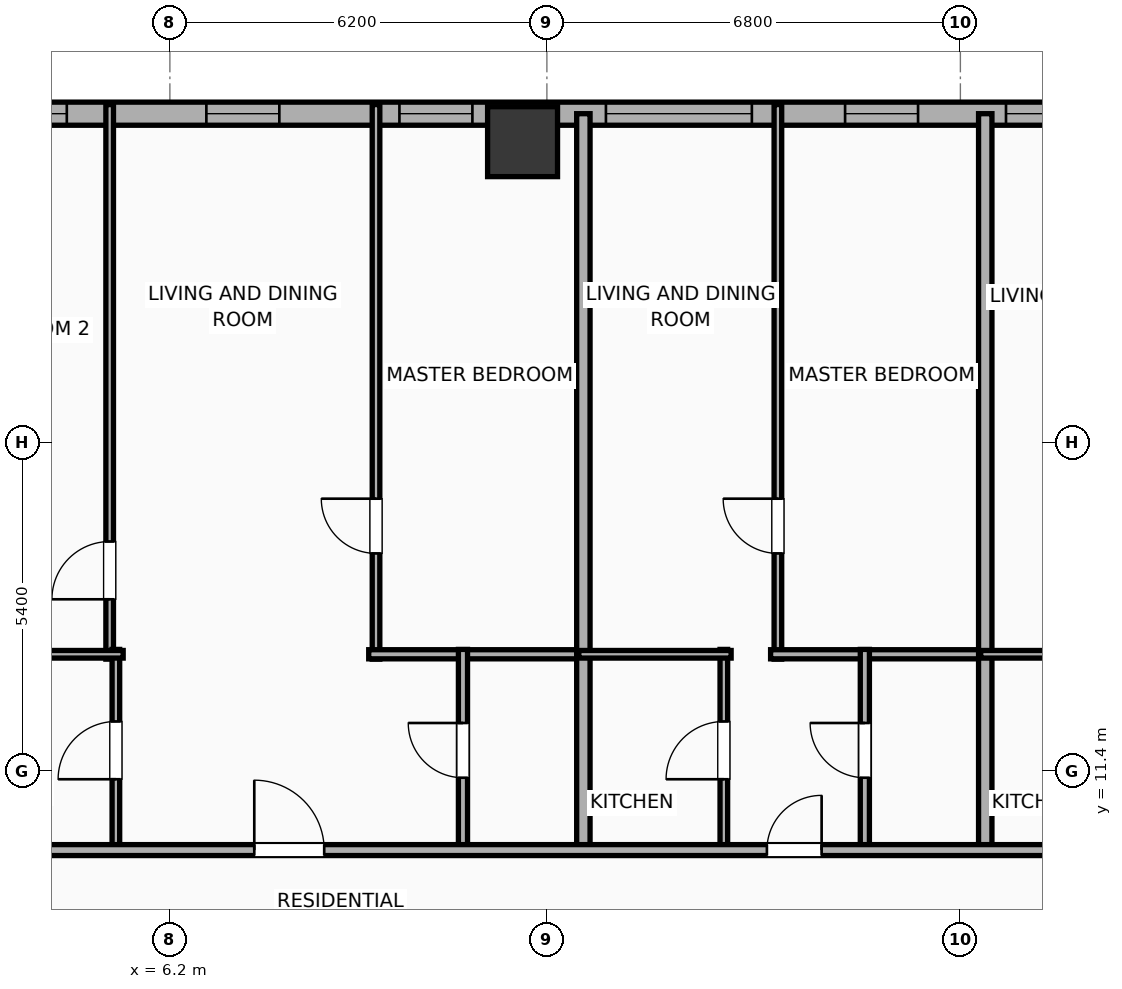
"""IFC4 building model, lengths in metres.
Left out: names, types, materials, properties, quantities, classifications, styles, units other than length and angle.
Written with IfcOpenShell. Run it as: python <this file> out.ifc"""

import sys

from ifc_helpers import new_model, si_unit, direction, frame, frame_2d, origin, origin_2d, place, context, subcontext, project, spatial, rectangle, hollow_rectangle, extrude, element, fill, save


model = new_model("IFC4")
c1 = context("Model", 3, precision=1e-05, world=origin(), true_north=direction((0.0, 1.0)))
c2 = subcontext(c1, "Body", "Model", "MODEL_VIEW")
j1 = project(units=[si_unit("LENGTHUNIT", "METRE"), si_unit("PLANEANGLEUNIT", "RADIAN")], contexts=[c1])
p1 = place(None, origin())
s1 = spatial("IfcSite", under=j1, at=p1, CompositionType="ELEMENT")
p2 = place(p1, origin())
s2 = spatial("IfcBuilding", under=s1, at=p2, CompositionType="ELEMENT")
p3 = place(p2, frame((0.0, 0.0, 37.7)))
s3 = spatial("IfcBuildingStorey", under=s2, at=p3, CompositionType="ELEMENT", Elevation=37.7)
p4 = place(p3, frame((12.0, 21.75, 0.0), z_axis=(0.0, 0.0, 1.0), x_axis=(1.0, 0.0, 0.0)))
e1 = element("IfcColumn", 1, at=p4, inside=s3, PredefinedType="COLUMN", context=c2, shape_type="SweptSolid", body=[
    extrude(hollow_rectangle(XDim=1.15, YDim=1.15, WallThickness=0.04, at=origin_2d()), origin(), (0.0, 0.0, 1.0), 3.9),
])
p5 = place(p3, frame((-29.581, 22.21, 0.0), z_axis=(0.0, 0.0, 1.0), x_axis=(1.0, 0.0, 0.0)))
e2 = element("IfcWall", 2, at=p5, inside=s3, PredefinedType="ELEMENTEDWALL", context=c2, shape_type="SweptSolid", body=[
    extrude(rectangle(XDim=51.963, YDim=0.38, at=frame_2d((25.981, 0.0))), origin(), (0.0, 0.0, 1.0), 3.65),
])
p6 = place(p5, frame((25.631, 0.0, 0.75)))
e3 = element("IfcOpeningElement", 3, at=p6, cuts=e2, PredefinedType="OPENING", context=c2, shape_type="SweptSolid", body=[
    extrude(rectangle(XDim=2.4, YDim=2.1, at=frame_2d((1.2, 1.05))), frame((0.0, 0.2, 0.0), z_axis=(0.0, -1.0, 0.0), x_axis=(1.0, 0.0, 0.0)), (0.0, 0.0, 1.0), 0.4),
])
p7 = place(p5, frame((42.952, 0.0, 0.75)))
e4 = element("IfcOpeningElement", 4, at=p7, cuts=e2, PredefinedType="OPENING", context=c2, shape_type="SweptSolid", body=[
    extrude(rectangle(XDim=2.4, YDim=2.1, at=frame_2d((1.2, 1.05))), frame((0.0, 0.2, 0.0), z_axis=(0.0, -1.0, 0.0), x_axis=(1.0, 0.0, 0.0)), (0.0, 0.0, 1.0), 0.4),
])
p8 = place(p5, frame((1.731, 0.0, 0.75)))
e5 = element("IfcOpeningElement", 5, at=p8, cuts=e2, PredefinedType="OPENING", context=c2, shape_type="SweptSolid", body=[
    extrude(rectangle(XDim=1.2, YDim=2.05, at=frame_2d((0.6, 1.025))), frame((0.0, 0.2, 0.0), z_axis=(0.0, -1.0, 0.0), x_axis=(1.0, 0.0, 0.0)), (0.0, 0.0, 1.0), 0.4),
])
p9 = place(p5, frame((5.272, 0.0, 0.75)))
e6 = element("IfcOpeningElement", 6, at=p9, cuts=e2, PredefinedType="OPENING", context=c2, shape_type="SweptSolid", body=[
    extrude(rectangle(XDim=1.2, YDim=2.05, at=frame_2d((0.6, 1.025))), frame((0.0, 0.2, 0.0), z_axis=(0.0, -1.0, 0.0), x_axis=(1.0, 0.0, 0.0)), (0.0, 0.0, 1.0), 0.4),
])
p10 = place(p5, frame((8.356, 0.0, 0.75)))
e7 = element("IfcOpeningElement", 7, at=p10, cuts=e2, PredefinedType="OPENING", context=c2, shape_type="SweptSolid", body=[
    extrude(rectangle(XDim=1.2, YDim=2.05, at=frame_2d((0.6, 1.025))), frame((0.0, 0.2, 0.0), z_axis=(0.0, -1.0, 0.0), x_axis=(1.0, 0.0, 0.0)), (0.0, 0.0, 1.0), 0.4),
])
p11 = place(p5, frame((15.632, 0.0, 0.75)))
e8 = element("IfcOpeningElement", 8, at=p11, cuts=e2, PredefinedType="OPENING", context=c2, shape_type="SweptSolid", body=[
    extrude(rectangle(XDim=1.2, YDim=2.05, at=frame_2d((0.6, 1.025))), frame((0.0, 0.2, 0.0), z_axis=(0.0, -1.0, 0.0), x_axis=(1.0, 0.0, 0.0)), (0.0, 0.0, 1.0), 0.4),
])
p12 = place(p5, frame((12.137, 0.0, 0.75)))
e9 = element("IfcOpeningElement", 9, at=p12, cuts=e2, PredefinedType="OPENING", context=c2, shape_type="SweptSolid", body=[
    extrude(rectangle(XDim=1.2, YDim=2.05, at=frame_2d((0.6, 1.025))), frame((0.0, 0.2, 0.0), z_axis=(0.0, -1.0, 0.0), x_axis=(1.0, 0.0, 0.0)), (0.0, 0.0, 1.0), 0.4),
])
p13 = place(p5, frame((18.756, 0.0, 0.75)))
e10 = element("IfcOpeningElement", 10, at=p13, cuts=e2, PredefinedType="OPENING", context=c2, shape_type="SweptSolid", body=[
    extrude(rectangle(XDim=1.2, YDim=2.05, at=frame_2d((0.6, 1.025))), frame((0.0, 0.2, 0.0), z_axis=(0.0, -1.0, 0.0), x_axis=(1.0, 0.0, 0.0)), (0.0, 0.0, 1.0), 0.4),
])
p14 = place(p5, frame((22.907, 0.0, 0.75)))
e11 = element("IfcOpeningElement", 11, at=p14, cuts=e2, PredefinedType="OPENING", context=c2, shape_type="SweptSolid", body=[
    extrude(rectangle(XDim=1.2, YDim=2.05, at=frame_2d((0.6, 1.025))), frame((0.0, 0.2, 0.0), z_axis=(0.0, -1.0, 0.0), x_axis=(1.0, 0.0, 0.0)), (0.0, 0.0, 1.0), 0.4),
])
p15 = place(p5, frame((36.381, 0.0, 0.75)))
e12 = element("IfcOpeningElement", 12, at=p15, cuts=e2, PredefinedType="OPENING", context=c2, shape_type="SweptSolid", body=[
    extrude(rectangle(XDim=1.2, YDim=2.05, at=frame_2d((0.6, 1.025))), frame((0.0, 0.2, 0.0), z_axis=(0.0, -1.0, 0.0), x_axis=(1.0, 0.0, 0.0)), (0.0, 0.0, 1.0), 0.4),
])
p16 = place(p5, frame((32.886, 0.0, 0.75)))
e13 = element("IfcOpeningElement", 13, at=p16, cuts=e2, PredefinedType="OPENING", context=c2, shape_type="SweptSolid", body=[
    extrude(rectangle(XDim=1.2, YDim=2.05, at=frame_2d((0.6, 1.025))), frame((0.0, 0.2, 0.0), z_axis=(0.0, -1.0, 0.0), x_axis=(1.0, 0.0, 0.0)), (0.0, 0.0, 1.0), 0.4),
])
p17 = place(p5, frame((39.556, 0.0, 0.75)))
e14 = element("IfcOpeningElement", 14, at=p17, cuts=e2, PredefinedType="OPENING", context=c2, shape_type="SweptSolid", body=[
    extrude(rectangle(XDim=1.2, YDim=2.05, at=frame_2d((0.6, 1.025))), frame((0.0, 0.2, 0.0), z_axis=(0.0, -1.0, 0.0), x_axis=(1.0, 0.0, 0.0)), (0.0, 0.0, 1.0), 0.4),
])
p18 = place(p5, frame((46.885, 0.0, 0.75)))
e15 = element("IfcOpeningElement", 15, at=p18, cuts=e2, PredefinedType="OPENING", context=c2, shape_type="SweptSolid", body=[
    extrude(rectangle(XDim=1.2, YDim=2.05, at=frame_2d((0.6, 1.025))), frame((0.0, 0.2, 0.0), z_axis=(0.0, -1.0, 0.0), x_axis=(1.0, 0.0, 0.0)), (0.0, 0.0, 1.0), 0.4),
])
p19 = place(p5, frame((49.531, 0.0, 0.75)))
e16 = element("IfcOpeningElement", 16, at=p19, cuts=e2, PredefinedType="OPENING", context=c2, shape_type="SweptSolid", body=[
    extrude(rectangle(XDim=1.2, YDim=2.05, at=frame_2d((0.6, 1.025))), frame((0.0, 0.2, 0.0), z_axis=(0.0, -1.0, 0.0), x_axis=(1.0, 0.0, 0.0)), (0.0, 0.0, 1.0), 0.4),
])
p20 = place(p3, frame((5.21, 13.24, 0.0), z_axis=(0.0, 0.0, 1.0), x_axis=(0.0, 1.0, 0.0)))
e17 = element("IfcWall", 17, at=p20, inside=s3, PredefinedType="PARTITIONING", context=c2, shape_type="SweptSolid", body=[
    extrude(rectangle(XDim=9.12, YDim=0.125, at=frame_2d((4.56, 0.0))), origin(), (0.0, 0.0, 1.0), 3.65),
])
p21 = place(p20, frame((0.984, 0.0, 0.0)))
e18 = element("IfcOpeningElement", 18, at=p21, cuts=e17, PredefinedType="OPENING", context=c2, shape_type="SweptSolid", body=[
    extrude(rectangle(XDim=0.95, YDim=2.05, at=frame_2d((0.475, 1.025))), frame((0.0, 0.073, 0.0), z_axis=(0.0, -1.0, 0.0), x_axis=(1.0, 0.0, 0.0)), (0.0, 0.0, 1.0), 0.145),
])
p22 = place(p3, frame((9.59, 13.24, 0.0), z_axis=(0.0, 0.0, 1.0), x_axis=(0.0, 1.0, 0.0)))
e19 = element("IfcWall", 19, at=p22, inside=s3, PredefinedType="PARTITIONING", context=c2, shape_type="SweptSolid", body=[
    extrude(rectangle(XDim=9.12, YDim=0.125, at=frame_2d((4.56, 0.0))), origin(), (0.0, 0.0, 1.0), 3.65),
])
p23 = place(p22, frame((1.739, 0.0, 0.0)))
e20 = element("IfcOpeningElement", 20, at=p23, cuts=e19, PredefinedType="OPENING", context=c2, shape_type="SweptSolid", body=[
    extrude(rectangle(XDim=0.9, YDim=2.05, at=frame_2d((0.45, 1.025))), frame((0.0, 0.073, 0.0), z_axis=(0.0, -1.0, 0.0), x_axis=(1.0, 0.0, 0.0)), (0.0, 0.0, 1.0), 0.145),
])
p24 = place(p3, frame((9.47, 13.32, 0.0), z_axis=(0.0, 0.0, 1.0), x_axis=(1.0, 0.0, 0.0)))
e21 = element("IfcWall", 21, at=p24, inside=s3, PredefinedType="PLUMBINGWALL", context=c2, shape_type="SweptSolid", body=[
    extrude(rectangle(XDim=3.605, YDim=0.15, at=frame_2d((1.802, 0.0))), origin(), (0.0, 0.0, 1.0), 3.65),
])
p25 = place(p3, frame((5.312, 10.08, 0.0), z_axis=(0.0, 0.0, 1.0), x_axis=(0.0, 1.0, 0.0)))
e22 = element("IfcWall", 22, at=p25, inside=s3, PredefinedType="PARTITIONING", context=c2, shape_type="SweptSolid", body=[
    extrude(rectangle(XDim=3.32, YDim=0.125, at=frame_2d((1.66, 0.0))), origin(), (0.0, 0.0, 1.0), 3.65),
])
p26 = place(p25, frame((1.185, 0.0, 0.0)))
e23 = element("IfcOpeningElement", 23, at=p26, cuts=e22, PredefinedType="OPENING", context=c2, shape_type="SweptSolid", body=[
    extrude(rectangle(XDim=0.95, YDim=2.05, at=frame_2d((0.475, 1.025))), frame((0.0, 0.073, 0.0), z_axis=(0.0, -1.0, 0.0), x_axis=(1.0, 0.0, 0.0)), (0.0, 0.0, 1.0), 0.145),
])
p27 = place(p3, frame((2.34, 13.32, 0.0), z_axis=(0.0, 0.0, 1.0), x_axis=(1.0, 0.0, 0.0)))
e24 = element("IfcWall", 24, at=p27, inside=s3, PredefinedType="PARTITIONING", context=c2, shape_type="SweptSolid", body=[
    extrude(rectangle(XDim=3.092, YDim=0.125, at=frame_2d((1.546, 0.0))), origin(), (0.0, 0.0, 1.0), 3.65),
])
p28 = place(p3, frame((11.02, 10.08, 0.0), z_axis=(0.0, 0.0, 1.0), x_axis=(0.0, 1.0, 0.0)))
e25 = element("IfcWall", 25, at=p28, inside=s3, PredefinedType="PLUMBINGWALL", context=c2, shape_type="SweptSolid", body=[
    extrude(rectangle(XDim=3.32, YDim=0.15, at=frame_2d((1.66, 0.0))), origin(), (0.0, 0.0, 1.0), 3.65),
])
p29 = place(p28, frame((1.21, 0.0, 0.0)))
e26 = element("IfcOpeningElement", 26, at=p29, cuts=e25, PredefinedType="OPENING", context=c2, shape_type="SweptSolid", body=[
    extrude(rectangle(XDim=0.9, YDim=2.05, at=frame_2d((0.45, 1.025))), frame((0.0, 0.085, 0.0), z_axis=(0.0, -1.0, 0.0), x_axis=(1.0, 0.0, 0.0)), (0.0, 0.0, 1.0), 0.17),
])
p30 = place(p3, frame((13.0, 10.02, 0.0), z_axis=(0.0, 0.0, 1.0), x_axis=(0.0, 1.0, 0.0)))
e27 = element("IfcWall", 27, at=p30, inside=s3, PredefinedType="PARTITIONING", context=c2, shape_type="SweptSolid", body=[
    extrude(rectangle(XDim=12.19, YDim=0.22, at=frame_2d((6.095, 0.0))), origin(), (0.0, 0.0, 1.0), 3.65),
])
p31 = place(p3, frame((16.199, 13.24, 0.0), z_axis=(0.0, 0.0, 1.0), x_axis=(0.0, 1.0, 0.0)))
e28 = element("IfcWall", 28, at=p31, inside=s3, PredefinedType="PARTITIONING", context=c2, shape_type="SweptSolid", body=[
    extrude(rectangle(XDim=9.12, YDim=0.125, at=frame_2d((4.56, 0.0))), origin(), (0.0, 0.0, 1.0), 3.65),
])
p32 = place(p31, frame((1.739, 0.0, 0.0)))
e29 = element("IfcOpeningElement", 29, at=p32, cuts=e28, PredefinedType="OPENING", context=c2, shape_type="SweptSolid", body=[
    extrude(rectangle(XDim=0.9, YDim=2.05, at=frame_2d((0.45, 1.025))), frame((0.0, 0.073, 0.0), z_axis=(0.0, -1.0, 0.0), x_axis=(1.0, 0.0, 0.0)), (0.0, 0.0, 1.0), 0.145),
])
p33 = place(p3, frame((16.079, 13.32, 0.0), z_axis=(0.0, 0.0, 1.0), x_axis=(1.0, 0.0, 0.0)))
e30 = element("IfcWall", 30, at=p33, inside=s3, PredefinedType="PLUMBINGWALL", context=c2, shape_type="SweptSolid", body=[
    extrude(rectangle(XDim=3.605, YDim=0.15, at=frame_2d((1.802, 0.0))), origin(), (0.0, 0.0, 1.0), 3.65),
])
p34 = place(p3, frame((15.31, 10.08, 0.0), z_axis=(0.0, 0.0, 1.0), x_axis=(0.0, 1.0, 0.0)))
e31 = element("IfcWall", 31, at=p34, inside=s3, PredefinedType="PARTITIONING", context=c2, shape_type="SweptSolid", body=[
    extrude(rectangle(XDim=3.32, YDim=0.125, at=frame_2d((1.66, 0.0))), origin(), (0.0, 0.0, 1.0), 3.65),
])
p35 = place(p34, frame((1.185, 0.0, 0.0)))
e32 = element("IfcOpeningElement", 32, at=p35, cuts=e31, PredefinedType="OPENING", context=c2, shape_type="SweptSolid", body=[
    extrude(rectangle(XDim=0.95, YDim=2.05, at=frame_2d((0.475, 1.025))), frame((0.0, 0.073, 0.0), z_axis=(0.0, -1.0, 0.0), x_axis=(1.0, 0.0, 0.0)), (0.0, 0.0, 1.0), 0.145),
])
p36 = place(p3, frame((12.925, 13.32, 0.0), z_axis=(0.0, 0.0, 1.0), x_axis=(1.0, 0.0, 0.0)))
e33 = element("IfcWall", 33, at=p36, inside=s3, PredefinedType="PARTITIONING", context=c2, shape_type="SweptSolid", body=[
    extrude(rectangle(XDim=2.505, YDim=0.125, at=frame_2d((1.252, 0.0))), origin(), (0.0, 0.0, 1.0), 3.65),
])
p37 = place(p3, frame((17.629, 10.08, 0.0), z_axis=(0.0, 0.0, 1.0), x_axis=(0.0, 1.0, 0.0)))
e34 = element("IfcWall", 34, at=p37, inside=s3, PredefinedType="PLUMBINGWALL", context=c2, shape_type="SweptSolid", body=[
    extrude(rectangle(XDim=3.32, YDim=0.15, at=frame_2d((1.66, 0.0))), origin(), (0.0, 0.0, 1.0), 3.65),
])
p38 = place(p37, frame((1.21, 0.0, 0.0)))
e35 = element("IfcOpeningElement", 35, at=p38, cuts=e34, PredefinedType="OPENING", context=c2, shape_type="SweptSolid", body=[
    extrude(rectangle(XDim=0.9, YDim=2.05, at=frame_2d((0.45, 1.025))), frame((0.0, 0.085, 0.0), z_axis=(0.0, -1.0, 0.0), x_axis=(1.0, 0.0, 0.0)), (0.0, 0.0, 1.0), 0.17),
])
p39 = place(p3, frame((19.609, 10.02, 0.0), z_axis=(0.0, 0.0, 1.0), x_axis=(0.0, 1.0, 0.0)))
e36 = element("IfcWall", 36, at=p39, inside=s3, PredefinedType="PARTITIONING", context=c2, shape_type="SweptSolid", body=[
    extrude(rectangle(XDim=12.19, YDim=0.22, at=frame_2d((6.095, 0.0))), origin(), (0.0, 0.0, 1.0), 3.65),
])
p40 = place(p3, frame((19.534, 13.32, 0.0), z_axis=(0.0, 0.0, 1.0), x_axis=(1.0, 0.0, 0.0)))
e37 = element("IfcWall", 37, at=p40, inside=s3, PredefinedType="PARTITIONING", context=c2, shape_type="SweptSolid", body=[
    extrude(rectangle(XDim=2.505, YDim=0.125, at=frame_2d((1.252, 0.0))), origin(), (0.0, 0.0, 1.0), 3.65),
])
p41 = place(p3, frame((-33.41, 10.1, 0.0), z_axis=(0.0, 0.0, 1.0), x_axis=(1.0, 0.0, 0.0)))
e38 = element("IfcWall", 38, at=p41, inside=s3, PredefinedType="PARTITIONING", context=c2, shape_type="SweptSolid", body=[
    extrude(rectangle(XDim=59.62, YDim=0.18, at=frame_2d((29.81, 0.0))), origin(), (0.0, 0.0, 1.0), 3.65),
])
p42 = place(p41, frame((3.354, 0.0, 0.0)))
e39 = element("IfcOpeningElement", 39, at=p42, cuts=e38, PredefinedType="OPENING", context=c2, shape_type="SweptSolid", body=[
    extrude(rectangle(XDim=1.15, YDim=2.05, at=frame_2d((0.575, 1.025))), frame((0.0, 0.1, 0.0), z_axis=(0.0, -1.0, 0.0), x_axis=(1.0, 0.0, 0.0)), (0.0, 0.0, 1.0), 0.2),
])
p43 = place(p41, frame((10.997, 0.0, 0.0)))
e40 = element("IfcOpeningElement", 40, at=p43, cuts=e38, PredefinedType="OPENING", context=c2, shape_type="SweptSolid", body=[
    extrude(rectangle(XDim=1.15, YDim=2.05, at=frame_2d((0.575, 1.025))), frame((0.0, 0.1, 0.0), z_axis=(0.0, -1.0, 0.0), x_axis=(1.0, 0.0, 0.0)), (0.0, 0.0, 1.0), 0.2),
])
p44 = place(p41, frame((20.232, 0.0, 0.0)))
e41 = element("IfcOpeningElement", 41, at=p44, cuts=e38, PredefinedType="OPENING", context=c2, shape_type="SweptSolid", body=[
    extrude(rectangle(XDim=1.15, YDim=2.05, at=frame_2d((0.575, 1.025))), frame((0.0, 0.1, 0.0), z_axis=(0.0, -1.0, 0.0), x_axis=(1.0, 0.0, 0.0)), (0.0, 0.0, 1.0), 0.2),
])
p45 = place(p41, frame((30.38, 0.0, 0.0)))
e42 = element("IfcOpeningElement", 42, at=p45, cuts=e38, PredefinedType="OPENING", context=c2, shape_type="SweptSolid", body=[
    extrude(rectangle(XDim=1.15, YDim=2.05, at=frame_2d((0.575, 1.025))), frame((0.0, 0.1, 0.0), z_axis=(0.0, -1.0, 0.0), x_axis=(1.0, 0.0, 0.0)), (0.0, 0.0, 1.0), 0.2),
])
p46 = place(p41, frame((40.998, 0.0, 0.0)))
e43 = element("IfcOpeningElement", 43, at=p46, cuts=e38, PredefinedType="OPENING", context=c2, shape_type="SweptSolid", body=[
    extrude(rectangle(XDim=1.15, YDim=2.05, at=frame_2d((0.575, 1.025))), frame((0.0, 0.1, 0.0), z_axis=(0.0, -1.0, 0.0), x_axis=(1.0, 0.0, 0.0)), (0.0, 0.0, 1.0), 0.2),
])
p47 = place(p41, frame((49.428, 0.0, 0.0)))
e44 = element("IfcOpeningElement", 44, at=p47, cuts=e38, PredefinedType="OPENING", context=c2, shape_type="SweptSolid", body=[
    extrude(rectangle(XDim=0.9, YDim=2.05, at=frame_2d((0.45, 1.025))), frame((0.0, 0.1, 0.0), z_axis=(0.0, -1.0, 0.0), x_axis=(1.0, 0.0, 0.0)), (0.0, 0.0, 1.0), 0.2),
])
p48 = place(p41, frame((56.07, 0.0, 0.0)))
e45 = element("IfcOpeningElement", 45, at=p48, cuts=e38, PredefinedType="OPENING", context=c2, shape_type="SweptSolid", body=[
    extrude(rectangle(XDim=0.9, YDim=2.05, at=frame_2d((0.45, 1.025))), frame((0.0, 0.1, 0.0), z_axis=(0.0, -1.0, 0.0), x_axis=(1.0, 0.0, 0.0)), (0.0, 0.0, 1.0), 0.2),
])
p49 = place(p7, origin())
e46 = element("IfcWindow", 46, at=p49, inside=s3, PartitioningType="SINGLE_PANEL", PredefinedType="WINDOW", context=c2, shape_type="SweptSolid", body=[
    extrude(rectangle(XDim=2.4, YDim=2.1, at=frame_2d((1.2, 1.05))), frame((0.0, 0.03, 0.0), z_axis=(0.0, -1.0, 0.0), x_axis=(1.0, 0.0, 0.0)), (0.0, 0.0, 1.0), 0.06),
])
fill(e4, e46)
p50 = place(p15, origin())
e47 = element("IfcWindow", 47, at=p50, inside=s3, PartitioningType="SINGLE_PANEL", PredefinedType="WINDOW", context=c2, shape_type="SweptSolid", body=[
    extrude(rectangle(XDim=1.2, YDim=2.05, at=frame_2d((0.6, 1.025))), frame((0.0, 0.03, 0.0), z_axis=(0.0, -1.0, 0.0), x_axis=(1.0, 0.0, 0.0)), (0.0, 0.0, 1.0), 0.06),
])
fill(e12, e47)
p51 = place(p16, origin())
e48 = element("IfcWindow", 48, at=p51, inside=s3, PartitioningType="SINGLE_PANEL", PredefinedType="WINDOW", context=c2, shape_type="SweptSolid", body=[
    extrude(rectangle(XDim=1.2, YDim=2.05, at=frame_2d((0.6, 1.025))), frame((0.0, 0.03, 0.0), z_axis=(0.0, -1.0, 0.0), x_axis=(1.0, 0.0, 0.0)), (0.0, 0.0, 1.0), 0.06),
])
fill(e13, e48)
p52 = place(p17, origin())
e49 = element("IfcWindow", 49, at=p52, inside=s3, PartitioningType="SINGLE_PANEL", PredefinedType="WINDOW", context=c2, shape_type="SweptSolid", body=[
    extrude(rectangle(XDim=1.2, YDim=2.05, at=frame_2d((0.6, 1.025))), frame((0.0, 0.03, 0.0), z_axis=(0.0, -1.0, 0.0), x_axis=(1.0, 0.0, 0.0)), (0.0, 0.0, 1.0), 0.06),
])
fill(e14, e49)
p53 = place(p18, origin())
e50 = element("IfcWindow", 50, at=p53, inside=s3, PartitioningType="SINGLE_PANEL", PredefinedType="WINDOW", context=c2, shape_type="SweptSolid", body=[
    extrude(rectangle(XDim=1.2, YDim=2.05, at=frame_2d((0.6, 1.025))), frame((0.0, 0.03, 0.0), z_axis=(0.0, -1.0, 0.0), x_axis=(1.0, 0.0, 0.0)), (0.0, 0.0, 1.0), 0.06),
])
fill(e15, e50)
p54 = place(p19, origin())
e51 = element("IfcWindow", 51, at=p54, inside=s3, PartitioningType="SINGLE_PANEL", PredefinedType="WINDOW", context=c2, shape_type="SweptSolid", body=[
    extrude(rectangle(XDim=1.2, YDim=2.05, at=frame_2d((0.6, 1.025))), frame((0.0, 0.03, 0.0), z_axis=(0.0, -1.0, 0.0), x_axis=(1.0, 0.0, 0.0)), (0.0, 0.0, 1.0), 0.06),
])
fill(e16, e51)
p55 = place(p21, origin())
e52 = element("IfcDoor", 52, at=p55, inside=s3, OperationType="SINGLE_SWING_LEFT", PredefinedType="DOOR", context=c2, shape_type="SweptSolid", body=[
    extrude(rectangle(XDim=0.95, YDim=2.05, at=frame_2d((0.475, 1.025))), frame((0.0, 0.025, 0.0), z_axis=(0.0, -1.0, 0.0), x_axis=(1.0, 0.0, 0.0)), (0.0, 0.0, 1.0), 0.05),
])
fill(e18, e52)
p56 = place(p23, origin())
e53 = element("IfcDoor", 53, at=p56, inside=s3, OperationType="SINGLE_SWING_RIGHT", PredefinedType="DOOR", context=c2, shape_type="SweptSolid", body=[
    extrude(rectangle(XDim=0.9, YDim=2.05, at=frame_2d((0.45, 1.025))), frame((0.0, 0.025, 0.0), z_axis=(0.0, -1.0, 0.0), x_axis=(1.0, 0.0, 0.0)), (0.0, 0.0, 1.0), 0.05),
])
fill(e20, e53)
p57 = place(p26, origin())
e54 = element("IfcDoor", 54, at=p57, inside=s3, OperationType="SINGLE_SWING_LEFT", PredefinedType="DOOR", context=c2, shape_type="SweptSolid", body=[
    extrude(rectangle(XDim=0.95, YDim=2.05, at=frame_2d((0.475, 1.025))), frame((0.0, 0.025, 0.0), z_axis=(0.0, -1.0, 0.0), x_axis=(1.0, 0.0, 0.0)), (0.0, 0.0, 1.0), 0.05),
])
fill(e23, e54)
p58 = place(p29, origin())
e55 = element("IfcDoor", 55, at=p58, inside=s3, OperationType="SINGLE_SWING_RIGHT", PredefinedType="DOOR", context=c2, shape_type="SweptSolid", body=[
    extrude(rectangle(XDim=0.9, YDim=2.05, at=frame_2d((0.45, 1.025))), frame((0.0, 0.025, 0.0), z_axis=(0.0, -1.0, 0.0), x_axis=(1.0, 0.0, 0.0)), (0.0, 0.0, 1.0), 0.05),
])
fill(e26, e55)
p59 = place(p32, origin())
e56 = element("IfcDoor", 56, at=p59, inside=s3, OperationType="SINGLE_SWING_RIGHT", PredefinedType="DOOR", context=c2, shape_type="SweptSolid", body=[
    extrude(rectangle(XDim=0.9, YDim=2.05, at=frame_2d((0.45, 1.025))), frame((0.0, 0.025, 0.0), z_axis=(0.0, -1.0, 0.0), x_axis=(1.0, 0.0, 0.0)), (0.0, 0.0, 1.0), 0.05),
])
fill(e29, e56)
p60 = place(p35, origin())
e57 = element("IfcDoor", 57, at=p60, inside=s3, OperationType="SINGLE_SWING_LEFT", PredefinedType="DOOR", context=c2, shape_type="SweptSolid", body=[
    extrude(rectangle(XDim=0.95, YDim=2.05, at=frame_2d((0.475, 1.025))), frame((0.0, 0.025, 0.0), z_axis=(0.0, -1.0, 0.0), x_axis=(1.0, 0.0, 0.0)), (0.0, 0.0, 1.0), 0.05),
])
fill(e32, e57)
p61 = place(p38, origin())
e58 = element("IfcDoor", 58, at=p61, inside=s3, OperationType="SINGLE_SWING_RIGHT", PredefinedType="DOOR", context=c2, shape_type="SweptSolid", body=[
    extrude(rectangle(XDim=0.9, YDim=2.05, at=frame_2d((0.45, 1.025))), frame((0.0, 0.025, 0.0), z_axis=(0.0, -1.0, 0.0), x_axis=(1.0, 0.0, 0.0)), (0.0, 0.0, 1.0), 0.05),
])
fill(e35, e58)
p62 = place(p46, origin())
e59 = element("IfcDoor", 59, at=p62, inside=s3, OperationType="SINGLE_SWING_LEFT", PredefinedType="DOOR", context=c2, shape_type="SweptSolid", body=[
    extrude(rectangle(XDim=1.15, YDim=2.05, at=frame_2d((0.575, 1.025))), frame((0.0, 0.025, 0.0), z_axis=(0.0, -1.0, 0.0), x_axis=(1.0, 0.0, 0.0)), (0.0, 0.0, 1.0), 0.05),
])
fill(e43, e59)
p63 = place(p47, origin())
e60 = element("IfcDoor", 60, at=p63, inside=s3, OperationType="SINGLE_SWING_RIGHT", PredefinedType="DOOR", context=c2, shape_type="SweptSolid", body=[
    extrude(rectangle(XDim=0.9, YDim=2.05, at=frame_2d((0.45, 1.025))), frame((0.0, 0.025, 0.0), z_axis=(0.0, -1.0, 0.0), x_axis=(1.0, 0.0, 0.0)), (0.0, 0.0, 1.0), 0.05),
])
fill(e44, e60)
save(model, sys.argv[1])
